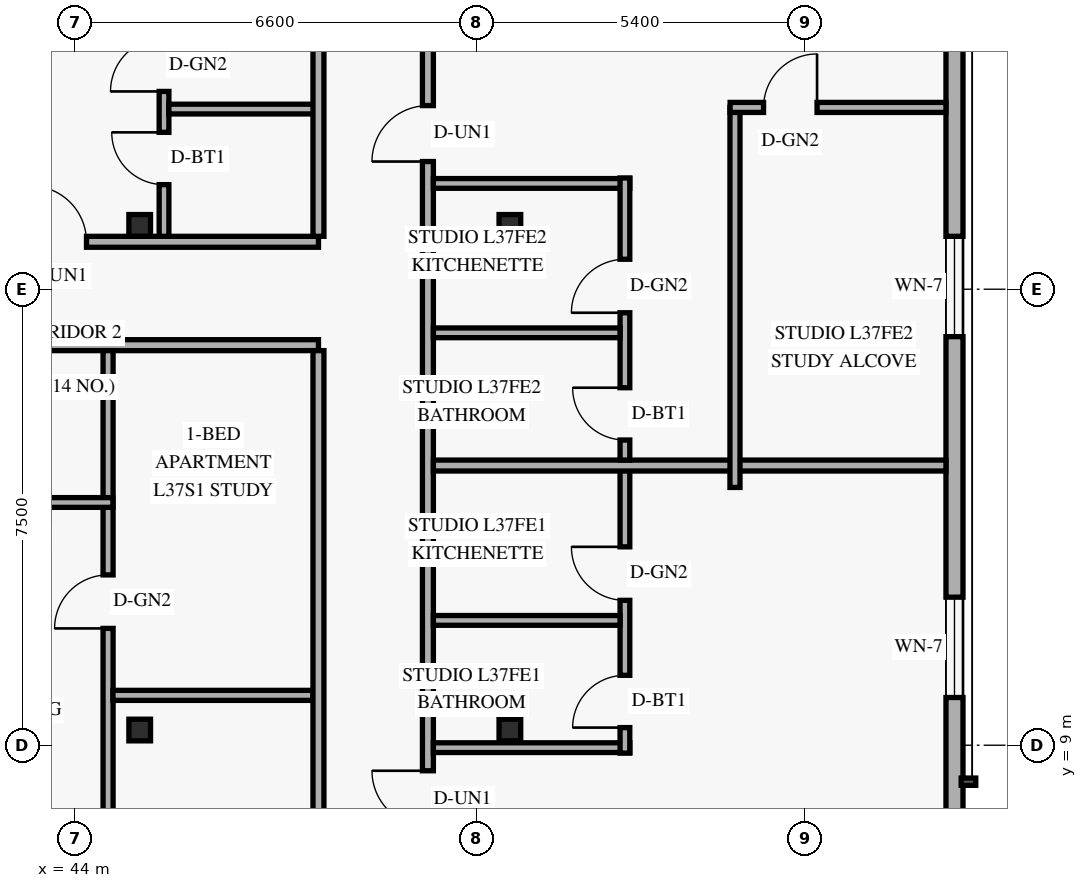
"""IFC4 building model, lengths in metres.
Left out: names, types, materials, properties, quantities, classifications, styles, units other than length and angle.
Written with IfcOpenShell. Run it as: python <this file> out.ifc"""

import sys

from ifc_helpers import new_model, si_unit, direction, frame, frame_2d, origin, origin_2d, place, context, subcontext, project, spatial, rectangle, hollow_rectangle, extrude, element, fill, save


model = new_model("IFC4")
c1 = context("Model", 3, precision=1e-05, world=origin(), true_north=direction((0.0, 1.0)))
c2 = subcontext(c1, "Body", "Model", "MODEL_VIEW")
j1 = project(units=[si_unit("LENGTHUNIT", "METRE"), si_unit("PLANEANGLEUNIT", "RADIAN")], contexts=[c1])
p1 = place(None, origin())
s1 = spatial("IfcSite", under=j1, at=p1, CompositionType="ELEMENT")
p2 = place(p1, origin())
s2 = spatial("IfcBuilding", under=s1, at=p2, CompositionType="ELEMENT")
p3 = place(p2, frame((0.0, 0.0, 144.6)))
s3 = spatial("IfcBuildingStorey", under=s2, at=p3, CompositionType="ELEMENT", Elevation=144.6)
for number, where, z_axis, x_axis in (
    (1, (44.997, 9.25, 0.0), (0.035, 0.0, 0.999), (0.0, 1.0, 0.0)),
    (2, (44.997, 17.55, 0.0), (0.035, 0.0, 0.999), (0.0, 1.0, 0.0)),
):
    element("IfcColumn", number, at=place(p3, frame(where, z_axis=z_axis, x_axis=x_axis)), inside=s3, PredefinedType="COLUMN", context=c2, shape_type="SweptSolid", body=[
        extrude(hollow_rectangle(XDim=0.356, YDim=0.356, WallThickness=0.016, at=origin_2d()), origin(), (0.0, 0.0, 1.0), 3.602),
    ])
for number, where, z_axis, x_axis in (
    (3, (51.044, 9.25, 0.0), (0.058, 0.0, 0.998), (0.0, 1.0, 0.0)),
    (4, (51.044, 17.55, 0.0), (0.058, 0.0, 0.998), (0.0, 1.0, 0.0)),
):
    element("IfcColumn", number, at=place(p3, frame(where, z_axis=z_axis, x_axis=x_axis)), inside=s3, PredefinedType="COLUMN", context=c2, shape_type="SweptSolid", body=[
        extrude(hollow_rectangle(XDim=0.356, YDim=0.356, WallThickness=0.016, at=origin_2d()), origin(), (0.0, 0.0, 1.0), 3.606),
    ])
p4 = place(p3, frame((58.46, 7.62, 0.0), z_axis=(0.0, 0.0, 1.0), x_axis=(0.0, 1.0, 0.0)))
e5 = element("IfcWall", 5, at=p4, inside=s3, PredefinedType="SOLIDWALL", context=c2, shape_type="SweptSolid", body=[
    extrude(rectangle(XDim=32.76, YDim=0.28, at=frame_2d((16.38, 0.0))), origin(), (0.0, 0.0, 1.0), 3.36),
])
p5 = place(p4, frame((2.165, 0.0, 0.85)))
e6 = element("IfcOpeningElement", 6, at=p5, cuts=e5, PredefinedType="OPENING", context=c2, shape_type="SweptSolid", body=[
    extrude(rectangle(XDim=1.65, YDim=1.6, at=frame_2d((0.825, 0.8))), frame((0.0, 0.15, 0.0), z_axis=(0.0, -1.0, 0.0), x_axis=(1.0, 0.0, 0.0)), (0.0, 0.0, 1.0), 0.3),
])
p6 = place(p4, frame((8.1, 0.0, 0.85)))
e7 = element("IfcOpeningElement", 7, at=p6, cuts=e5, PredefinedType="OPENING", context=c2, shape_type="SweptSolid", body=[
    extrude(rectangle(XDim=1.65, YDim=1.6, at=frame_2d((0.825, 0.8))), frame((0.0, 0.15, 0.0), z_axis=(0.0, -1.0, 0.0), x_axis=(1.0, 0.0, 0.0)), (0.0, 0.0, 1.0), 0.3),
])
p7 = place(p4, frame((13.5, 0.0, 0.85)))
e8 = element("IfcOpeningElement", 8, at=p7, cuts=e5, PredefinedType="OPENING", context=c2, shape_type="SweptSolid", body=[
    extrude(rectangle(XDim=1.65, YDim=1.6, at=frame_2d((0.825, 0.8))), frame((0.0, 0.15, 0.0), z_axis=(0.0, -1.0, 0.0), x_axis=(1.0, 0.0, 0.0)), (0.0, 0.0, 1.0), 0.3),
])
p8 = place(p4, frame((19.424, 0.0, 0.85)))
e9 = element("IfcOpeningElement", 9, at=p8, cuts=e5, PredefinedType="OPENING", context=c2, shape_type="SweptSolid", body=[
    extrude(rectangle(XDim=1.65, YDim=1.6, at=frame_2d((0.825, 0.8))), frame((0.0, 0.15, 0.0), z_axis=(0.0, -1.0, 0.0), x_axis=(1.0, 0.0, 0.0)), (0.0, 0.0, 1.0), 0.3),
])
p9 = place(p4, frame((24.624, 0.0, 0.85)))
e10 = element("IfcOpeningElement", 10, at=p9, cuts=e5, PredefinedType="OPENING", context=c2, shape_type="SweptSolid", body=[
    extrude(rectangle(XDim=1.65, YDim=1.6, at=frame_2d((0.825, 0.8))), frame((0.0, 0.15, 0.0), z_axis=(0.0, -1.0, 0.0), x_axis=(1.0, 0.0, 0.0)), (0.0, 0.0, 1.0), 0.3),
])
p10 = place(p4, frame((29.145, 0.0, 0.85)))
e11 = element("IfcOpeningElement", 11, at=p10, cuts=e5, PredefinedType="OPENING", context=c2, shape_type="SweptSolid", body=[
    extrude(rectangle(XDim=1.65, YDim=1.6, at=frame_2d((0.825, 0.8))), frame((0.0, 0.15, 0.0), z_axis=(0.0, -1.0, 0.0), x_axis=(1.0, 0.0, 0.0)), (0.0, 0.0, 1.0), 0.3),
])
p11 = place(p3, frame((38.433, 15.58, 0.0), z_axis=(0.0, 0.0, 1.0), x_axis=(1.0, 0.0, 0.0)))
e12 = element("IfcWall", 12, at=p11, inside=s3, PredefinedType="STANDARD", context=c2, shape_type="SweptSolid", body=[
    extrude(rectangle(XDim=9.567, YDim=0.18, at=frame_2d((4.784, 0.0))), origin(), (0.0, 0.0, 1.0), 2.73),
])
p12 = place(p11, frame((0.327, 0.0, 0.0)))
e13 = element("IfcOpeningElement", 13, at=p12, cuts=e12, PredefinedType="OPENING", context=c2, shape_type="SweptSolid", body=[
    extrude(rectangle(XDim=0.92, YDim=2.15, at=frame_2d((0.46, 1.075))), frame((0.0, 0.1, 0.0), z_axis=(0.0, -1.0, 0.0), x_axis=(1.0, 0.0, 0.0)), (0.0, 0.0, 1.0), 0.2),
])
p13 = place(p3, frame((37.64, 17.28, 0.0), z_axis=(0.0, 0.0, 1.0), x_axis=(1.0, 0.0, 0.0)))
e14 = element("IfcWall", 14, at=p13, inside=s3, PredefinedType="STANDARD", context=c2, shape_type="SweptSolid", body=[
    extrude(rectangle(XDim=10.36, YDim=0.18, at=frame_2d((5.18, 0.0))), origin(), (0.0, 0.0, 1.0), 2.73),
])
p14 = place(p13, frame((5.625, 0.0, 0.0)))
e15 = element("IfcOpeningElement", 15, at=p14, cuts=e14, PredefinedType="OPENING", context=c2, shape_type="SweptSolid", body=[
    extrude(rectangle(XDim=0.92, YDim=2.15, at=frame_2d((0.46, 1.075))), frame((0.0, 0.1, 0.0), z_axis=(0.0, -1.0, 0.0), x_axis=(1.0, 0.0, 0.0)), (0.0, 0.0, 1.0), 0.2),
])
p15 = place(p3, frame((44.54, 4.28, 0.0), z_axis=(0.0, 0.0, 1.0), x_axis=(0.0, 1.0, 0.0)))
e16 = element("IfcWall", 16, at=p15, inside=s3, PredefinedType="PARTITIONING", context=c2, shape_type="SweptSolid", body=[
    extrude(rectangle(XDim=11.21, YDim=0.165, at=frame_2d((5.605, 0.0))), origin(), (0.0, 0.0, 1.0), 2.73),
])
p16 = place(p15, frame((2.5, 0.0, 0.0)))
e17 = element("IfcOpeningElement", 17, at=p16, cuts=e16, PredefinedType="OPENING", context=c2, shape_type="SweptSolid", body=[
    extrude(rectangle(XDim=0.88, YDim=2.14, at=frame_2d((0.44, 1.07))), frame((0.0, 0.093, 0.0), z_axis=(0.0, -1.0, 0.0), x_axis=(1.0, 0.0, 0.0)), (0.0, 0.0, 1.0), 0.185),
])
p17 = place(p15, frame((6.641, 0.0, 0.0)))
e18 = element("IfcOpeningElement", 18, at=p17, cuts=e16, PredefinedType="OPENING", context=c2, shape_type="SweptSolid", body=[
    extrude(rectangle(XDim=0.88, YDim=2.12, at=frame_2d((0.44, 1.06))), frame((0.0, 0.093, 0.0), z_axis=(0.0, -1.0, 0.0), x_axis=(1.0, 0.0, 0.0)), (0.0, 0.0, 1.0), 0.185),
])
p18 = place(p3, frame((39.91, 12.992, 0.0), z_axis=(0.0, 0.0, 1.0), x_axis=(1.0, 0.0, 0.0)))
e19 = element("IfcWall", 19, at=p18, inside=s3, PredefinedType="PLUMBINGWALL", context=c2, shape_type="SweptSolid", body=[
    extrude(rectangle(XDim=4.71, YDim=0.16, at=frame_2d((2.355, 0.0))), origin(), (0.0, 0.0, 1.0), 3.36),
])
p19 = place(p18, frame((0.38, 0.0, 0.0)))
e20 = element("IfcOpeningElement", 20, at=p19, cuts=e19, PredefinedType="OPENING", context=c2, shape_type="SweptSolid", body=[
    extrude(rectangle(XDim=0.88, YDim=2.12, at=frame_2d((0.44, 1.06))), frame((0.0, 0.09, 0.0), z_axis=(0.0, -1.0, 0.0), x_axis=(1.0, 0.0, 0.0)), (0.0, 0.0, 1.0), 0.18),
])
p20 = place(p18, frame((2.786, 0.0, 0.0)))
e21 = element("IfcOpeningElement", 21, at=p20, cuts=e19, PredefinedType="OPENING", context=c2, shape_type="SweptSolid", body=[
    extrude(rectangle(XDim=0.86, YDim=2.12, at=frame_2d((0.43, 1.06))), frame((0.0, 0.09, 0.0), z_axis=(0.0, -1.0, 0.0), x_axis=(1.0, 0.0, 0.0)), (0.0, 0.0, 1.0), 0.18),
])
p21 = place(p3, frame((44.62, 9.82, 0.0), z_axis=(0.0, 0.0, 1.0), x_axis=(1.0, 0.0, 0.0)))
e22 = element("IfcWall", 22, at=p21, inside=s3, PredefinedType="PARTITIONING", context=c2, shape_type="SweptSolid", body=[
    extrude(rectangle(XDim=3.29, YDim=0.165, at=frame_2d((1.645, 0.0))), origin(), (0.0, 0.0, 1.0), 2.73),
])
p22 = place(p3, frame((45.46, 17.37, 0.0), z_axis=(0.0, 0.0, 1.0), x_axis=(0.0, 1.0, 0.0)))
e23 = element("IfcWall", 23, at=p22, inside=s3, PredefinedType="PLUMBINGWALL", context=c2, shape_type="SweptSolid", body=[
    extrude(rectangle(XDim=4.64, YDim=0.16, at=frame_2d((2.32, 0.0))), origin(), (0.0, 0.0, 1.0), 2.73),
])
p23 = place(p22, frame((0.85, 0.0, 0.0)))
e24 = element("IfcOpeningElement", 24, at=p23, cuts=e23, PredefinedType="OPENING", context=c2, shape_type="SweptSolid", body=[
    extrude(rectangle(XDim=0.86, YDim=2.12, at=frame_2d((0.43, 1.06))), frame((0.0, 0.09, 0.0), z_axis=(0.0, -1.0, 0.0), x_axis=(1.0, 0.0, 0.0)), (0.0, 0.0, 1.0), 0.18),
])
p24 = place(p22, frame((2.383, 0.0, 0.0)))
e25 = element("IfcOpeningElement", 25, at=p24, cuts=e23, PredefinedType="OPENING", context=c2, shape_type="SweptSolid", body=[
    extrude(rectangle(XDim=0.88, YDim=2.12, at=frame_2d((0.44, 1.06))), frame((0.0, 0.09, 0.0), z_axis=(0.0, -1.0, 0.0), x_axis=(1.0, 0.0, 0.0)), (0.0, 0.0, 1.0), 0.18),
])
p25 = place(p3, frame((45.54, 19.463, 0.0), z_axis=(0.0, 0.0, 1.0), x_axis=(1.0, 0.0, 0.0)))
e26 = element("IfcWall", 26, at=p25, inside=s3, PredefinedType="PLUMBINGWALL", context=c2, shape_type="SweptSolid", body=[
    extrude(rectangle(XDim=2.46, YDim=0.16, at=frame_2d((1.23, 0.0))), origin(), (0.0, 0.0, 1.0), 3.36),
])
p26 = place(p3, frame((49.8, 4.28, 0.0), z_axis=(0.0, 0.0, 1.0), x_axis=(0.0, 1.0, 0.0)))
e27 = element("IfcWall", 27, at=p26, inside=s3, PredefinedType="STANDARD", context=c2, shape_type="SweptSolid", body=[
    extrude(rectangle(XDim=39.44, YDim=0.18, at=frame_2d((19.72, 0.0))), origin(), (0.0, 0.0, 1.0), 2.73),
])
p27 = place(p26, frame((3.38, 0.0, 0.0)))
e28 = element("IfcOpeningElement", 28, at=p27, cuts=e27, PredefinedType="OPENING", context=c2, shape_type="SweptSolid", body=[
    extrude(rectangle(XDim=0.92, YDim=2.15, at=frame_2d((0.46, 1.075))), frame((0.0, 0.1, 0.0), z_axis=(0.0, -1.0, 0.0), x_axis=(1.0, 0.0, 0.0)), (0.0, 0.0, 1.0), 0.2),
])
p28 = place(p26, frame((14.32, 0.0, 0.0)))
e29 = element("IfcOpeningElement", 29, at=p28, cuts=e27, PredefinedType="OPENING", context=c2, shape_type="SweptSolid", body=[
    extrude(rectangle(XDim=0.92, YDim=2.15, at=frame_2d((0.46, 1.075))), frame((0.0, 0.1, 0.0), z_axis=(0.0, -1.0, 0.0), x_axis=(1.0, 0.0, 0.0)), (0.0, 0.0, 1.0), 0.2),
])
p29 = place(p26, frame((21.05, 0.0, 0.0)))
e30 = element("IfcOpeningElement", 30, at=p29, cuts=e27, PredefinedType="OPENING", context=c2, shape_type="SweptSolid", body=[
    extrude(rectangle(XDim=0.92, YDim=2.15, at=frame_2d((0.46, 1.075))), frame((0.0, 0.1, 0.0), z_axis=(0.0, -1.0, 0.0), x_axis=(1.0, 0.0, 0.0)), (0.0, 0.0, 1.0), 0.2),
])
p30 = place(p26, frame((35.42, 0.0, 0.0)))
e31 = element("IfcOpeningElement", 31, at=p30, cuts=e27, PredefinedType="OPENING", context=c2, shape_type="SweptSolid", body=[
    extrude(rectangle(XDim=0.92, YDim=2.15, at=frame_2d((0.46, 1.075))), frame((0.0, 0.1, 0.0), z_axis=(0.0, -1.0, 0.0), x_axis=(1.0, 0.0, 0.0)), (0.0, 0.0, 1.0), 0.2),
])
p31 = place(p3, frame((48.0, 4.28, 0.0), z_axis=(0.0, 0.0, 1.0), x_axis=(0.0, 1.0, 0.0)))
e32 = element("IfcWall", 32, at=p31, inside=s3, PredefinedType="STANDARD", context=c2, shape_type="SweptSolid", body=[
    extrude(rectangle(XDim=11.21, YDim=0.18, at=frame_2d((5.605, 0.0))), origin(), (0.0, 0.0, 1.0), 2.73),
])
p32 = place(p3, frame((48.0, 17.37, 0.0), z_axis=(0.0, 0.0, 1.0), x_axis=(0.0, 1.0, 0.0)))
e33 = element("IfcWall", 33, at=p32, inside=s3, PredefinedType="STANDARD", context=c2, shape_type="SweptSolid", body=[
    extrude(rectangle(XDim=10.1, YDim=0.18, at=frame_2d((5.05, 0.0))), origin(), (0.0, 0.0, 1.0), 2.73),
])
p33 = place(p3, frame((49.89, 8.96, 0.0), z_axis=(0.0, 0.0, 1.0), x_axis=(1.0, 0.0, 0.0)))
e34 = element("IfcWall", 34, at=p33, inside=s3, PredefinedType="PLUMBINGWALL", context=c2, shape_type="SweptSolid", body=[
    extrude(rectangle(XDim=3.23, YDim=0.16, at=frame_2d((1.615, 0.0))), origin(), (0.0, 0.0, 1.0), 2.879),
])
p34 = place(p3, frame((53.04, 8.87, 0.0), z_axis=(0.0, 0.0, 1.0), x_axis=(0.0, 1.0, 0.0)))
e35 = element("IfcWall", 35, at=p34, inside=s3, PredefinedType="PLUMBINGWALL", context=c2, shape_type="SweptSolid", body=[
    extrude(rectangle(XDim=4.73, YDim=0.16, at=frame_2d((2.365, 0.0))), origin(), (0.0, 0.0, 1.0), 3.36),
])
p35 = place(p34, frame((0.42, 0.0, 0.0)))
e36 = element("IfcOpeningElement", 36, at=p35, cuts=e35, PredefinedType="OPENING", context=c2, shape_type="SweptSolid", body=[
    extrude(rectangle(XDim=0.86, YDim=2.12, at=frame_2d((0.43, 1.06))), frame((0.0, 0.09, 0.0), z_axis=(0.0, -1.0, 0.0), x_axis=(1.0, 0.0, 0.0)), (0.0, 0.0, 1.0), 0.18),
])
p36 = place(p34, frame((2.513, 0.0, 0.0)))
e37 = element("IfcOpeningElement", 37, at=p36, cuts=e35, PredefinedType="OPENING", context=c2, shape_type="SweptSolid", body=[
    extrude(rectangle(XDim=0.88, YDim=2.12, at=frame_2d((0.44, 1.06))), frame((0.0, 0.09, 0.0), z_axis=(0.0, -1.0, 0.0), x_axis=(1.0, 0.0, 0.0)), (0.0, 0.0, 1.0), 0.18),
])
p37 = place(p3, frame((49.89, 11.053, 0.0), z_axis=(0.0, 0.0, 1.0), x_axis=(1.0, 0.0, 0.0)))
e38 = element("IfcWall", 38, at=p37, inside=s3, PredefinedType="PLUMBINGWALL", context=c2, shape_type="SweptSolid", body=[
    extrude(rectangle(XDim=3.07, YDim=0.16, at=frame_2d((1.535, 0.0))), origin(), (0.0, 0.0, 1.0), 2.879),
])
p38 = place(p3, frame((49.89, 13.6, 0.0), z_axis=(0.0, 0.0, 1.0), x_axis=(1.0, 0.0, 0.0)))
e39 = element("IfcWall", 39, at=p38, inside=s3, PredefinedType="PARTITIONING", context=c2, shape_type="SweptSolid", body=[
    extrude(rectangle(XDim=8.43, YDim=0.18, at=frame_2d((4.215, 0.0))), origin(), (0.0, 0.0, 1.0), 2.879),
])
p39 = place(p3, frame((49.89, 18.24, 0.0), z_axis=(0.0, 0.0, 1.0), x_axis=(1.0, 0.0, 0.0)))
e40 = element("IfcWall", 40, at=p39, inside=s3, PredefinedType="PLUMBINGWALL", context=c2, shape_type="SweptSolid", body=[
    extrude(rectangle(XDim=3.23, YDim=0.16, at=frame_2d((1.615, 0.0))), origin(), (0.0, 0.0, 1.0), 2.879),
])
p40 = place(p3, frame((53.04, 13.69, 0.0), z_axis=(0.0, 0.0, 1.0), x_axis=(0.0, 1.0, 0.0)))
e41 = element("IfcWall", 41, at=p40, inside=s3, PredefinedType="PLUMBINGWALL", context=c2, shape_type="SweptSolid", body=[
    extrude(rectangle(XDim=4.64, YDim=0.16, at=frame_2d((2.32, 0.0))), origin(), (0.0, 0.0, 1.0), 3.36),
])
p41 = place(p40, frame((0.33, 0.0, 0.0)))
e42 = element("IfcOpeningElement", 42, at=p41, cuts=e41, PredefinedType="OPENING", context=c2, shape_type="SweptSolid", body=[
    extrude(rectangle(XDim=0.86, YDim=2.12, at=frame_2d((0.43, 1.06))), frame((0.0, 0.09, 0.0), z_axis=(0.0, -1.0, 0.0), x_axis=(1.0, 0.0, 0.0)), (0.0, 0.0, 1.0), 0.18),
])
p42 = place(p40, frame((2.423, 0.0, 0.0)))
e43 = element("IfcOpeningElement", 43, at=p42, cuts=e41, PredefinedType="OPENING", context=c2, shape_type="SweptSolid", body=[
    extrude(rectangle(XDim=0.88, YDim=2.12, at=frame_2d((0.44, 1.06))), frame((0.0, 0.09, 0.0), z_axis=(0.0, -1.0, 0.0), x_axis=(1.0, 0.0, 0.0)), (0.0, 0.0, 1.0), 0.18),
])
p43 = place(p3, frame((49.89, 15.783, 0.0), z_axis=(0.0, 0.0, 1.0), x_axis=(1.0, 0.0, 0.0)))
e44 = element("IfcWall", 44, at=p43, inside=s3, PredefinedType="PLUMBINGWALL", context=c2, shape_type="SweptSolid", body=[
    extrude(rectangle(XDim=3.07, YDim=0.16, at=frame_2d((1.535, 0.0))), origin(), (0.0, 0.0, 1.0), 2.879),
])
p44 = place(p3, frame((54.85, 13.24, 0.0), z_axis=(0.0, 0.0, 1.0), x_axis=(0.0, 1.0, 0.0)))
e45 = element("IfcWall", 45, at=p44, inside=s3, PredefinedType="PARTITIONING", context=c2, shape_type="SweptSolid", body=[
    extrude(rectangle(XDim=6.25, YDim=0.165, at=frame_2d((3.125, 0.0))), origin(), (0.0, 0.0, 1.0), 3.36),
])
p45 = place(p3, frame((54.77, 19.49, 0.0), z_axis=(0.0, 0.0, 1.0), x_axis=(1.0, 0.0, 0.0)))
e46 = element("IfcWall", 46, at=p45, inside=s3, PredefinedType="PARTITIONING", context=c2, shape_type="SweptSolid", body=[
    extrude(rectangle(XDim=3.55, YDim=0.165, at=frame_2d((1.775, 0.0))), origin(), (0.0, 0.0, 1.0), 3.36),
])
p46 = place(p45, frame((0.55, 0.0, 0.0)))
e47 = element("IfcOpeningElement", 47, at=p46, cuts=e46, PredefinedType="OPENING", context=c2, shape_type="SweptSolid", body=[
    extrude(rectangle(XDim=0.88, YDim=2.12, at=frame_2d((0.44, 1.06))), frame((0.0, 0.093, 0.0), z_axis=(0.0, -1.0, 0.0), x_axis=(1.0, 0.0, 0.0)), (0.0, 0.0, 1.0), 0.185),
])
p47 = place(p5, origin())
e48 = element("IfcWindow", 48, at=p47, inside=s3, PartitioningType="SINGLE_PANEL", PredefinedType="WINDOW", context=c2, shape_type="SweptSolid", body=[
    extrude(rectangle(XDim=1.65, YDim=1.6, at=frame_2d((0.825, 0.8))), frame((0.0, 0.03, 0.0), z_axis=(0.0, -1.0, 0.0), x_axis=(1.0, 0.0, 0.0)), (0.0, 0.0, 1.0), 0.06),
])
fill(e6, e48)
p48 = place(p6, origin())
e49 = element("IfcWindow", 49, at=p48, inside=s3, PartitioningType="SINGLE_PANEL", PredefinedType="WINDOW", context=c2, shape_type="SweptSolid", body=[
    extrude(rectangle(XDim=1.65, YDim=1.6, at=frame_2d((0.825, 0.8))), frame((0.0, 0.03, 0.0), z_axis=(0.0, -1.0, 0.0), x_axis=(1.0, 0.0, 0.0)), (0.0, 0.0, 1.0), 0.06),
])
fill(e7, e49)
p49 = place(p17, origin())
e50 = element("IfcDoor", 50, at=p49, inside=s3, OperationType="SINGLE_SWING_LEFT", PredefinedType="DOOR", context=c2, shape_type="SweptSolid", body=[
    extrude(rectangle(XDim=0.88, YDim=2.12, at=frame_2d((0.44, 1.06))), frame((0.0, 0.025, 0.0), z_axis=(0.0, -1.0, 0.0), x_axis=(1.0, 0.0, 0.0)), (0.0, 0.0, 1.0), 0.05),
])
fill(e18, e50)
p50 = place(p14, origin())
e51 = element("IfcDoor", 51, at=p50, inside=s3, OperationType="SINGLE_SWING_LEFT", PredefinedType="DOOR", context=c2, shape_type="SweptSolid", body=[
    extrude(rectangle(XDim=0.92, YDim=2.15, at=frame_2d((0.46, 1.075))), frame((0.0, 0.025, 0.0), z_axis=(0.0, -1.0, 0.0), x_axis=(1.0, 0.0, 0.0)), (0.0, 0.0, 1.0), 0.05),
])
fill(e15, e51)
p51 = place(p23, origin())
e52 = element("IfcDoor", 52, at=p51, inside=s3, OperationType="SINGLE_SWING_RIGHT", PredefinedType="DOOR", context=c2, shape_type="SweptSolid", body=[
    extrude(rectangle(XDim=0.86, YDim=2.12, at=frame_2d((0.43, 1.06))), frame((0.0, 0.025, 0.0), z_axis=(0.0, -1.0, 0.0), x_axis=(1.0, 0.0, 0.0)), (0.0, 0.0, 1.0), 0.05),
])
fill(e24, e52)
p52 = place(p24, origin())
e53 = element("IfcDoor", 53, at=p52, inside=s3, OperationType="SINGLE_SWING_LEFT", PredefinedType="DOOR", context=c2, shape_type="SweptSolid", body=[
    extrude(rectangle(XDim=0.88, YDim=2.12, at=frame_2d((0.44, 1.06))), frame((0.0, 0.025, 0.0), z_axis=(0.0, -1.0, 0.0), x_axis=(1.0, 0.0, 0.0)), (0.0, 0.0, 1.0), 0.05),
])
fill(e25, e53)
p53 = place(p27, origin())
e54 = element("IfcDoor", 54, at=p53, inside=s3, OperationType="SINGLE_SWING_RIGHT", PredefinedType="DOOR", context=c2, shape_type="SweptSolid", body=[
    extrude(rectangle(XDim=0.92, YDim=2.15, at=frame_2d((0.46, 1.075))), frame((0.0, 0.025, 0.0), z_axis=(0.0, -1.0, 0.0), x_axis=(1.0, 0.0, 0.0)), (0.0, 0.0, 1.0), 0.05),
])
fill(e28, e54)
p54 = place(p35, origin())
e55 = element("IfcDoor", 55, at=p54, inside=s3, OperationType="SINGLE_SWING_LEFT", PredefinedType="DOOR", context=c2, shape_type="SweptSolid", body=[
    extrude(rectangle(XDim=0.86, YDim=2.12, at=frame_2d((0.43, 1.06))), frame((0.0, 0.025, 0.0), z_axis=(0.0, -1.0, 0.0), x_axis=(1.0, 0.0, 0.0)), (0.0, 0.0, 1.0), 0.05),
])
fill(e36, e55)
p55 = place(p36, origin())
e56 = element("IfcDoor", 56, at=p55, inside=s3, OperationType="SINGLE_SWING_RIGHT", PredefinedType="DOOR", context=c2, shape_type="SweptSolid", body=[
    extrude(rectangle(XDim=0.88, YDim=2.12, at=frame_2d((0.44, 1.06))), frame((0.0, 0.025, 0.0), z_axis=(0.0, -1.0, 0.0), x_axis=(1.0, 0.0, 0.0)), (0.0, 0.0, 1.0), 0.05),
])
fill(e37, e56)
p56 = place(p46, origin())
e57 = element("IfcDoor", 57, at=p56, inside=s3, OperationType="SINGLE_SWING_RIGHT", PredefinedType="DOOR", context=c2, shape_type="SweptSolid", body=[
    extrude(rectangle(XDim=0.88, YDim=2.12, at=frame_2d((0.44, 1.06))), frame((0.0, 0.025, 0.0), z_axis=(0.0, -1.0, 0.0), x_axis=(1.0, 0.0, 0.0)), (0.0, 0.0, 1.0), 0.05),
])
fill(e47, e57)
p57 = place(p28, origin())
e58 = element("IfcDoor", 58, at=p57, inside=s3, OperationType="SINGLE_SWING_LEFT", PredefinedType="DOOR", context=c2, shape_type="SweptSolid", body=[
    extrude(rectangle(XDim=0.92, YDim=2.15, at=frame_2d((0.46, 1.075))), frame((0.0, 0.025, 0.0), z_axis=(0.0, -1.0, 0.0), x_axis=(1.0, 0.0, 0.0)), (0.0, 0.0, 1.0), 0.05),
])
fill(e29, e58)
p58 = place(p41, origin())
e59 = element("IfcDoor", 59, at=p58, inside=s3, OperationType="SINGLE_SWING_RIGHT", PredefinedType="DOOR", context=c2, shape_type="SweptSolid", body=[
    extrude(rectangle(XDim=0.86, YDim=2.12, at=frame_2d((0.43, 1.06))), frame((0.0, 0.025, 0.0), z_axis=(0.0, -1.0, 0.0), x_axis=(1.0, 0.0, 0.0)), (0.0, 0.0, 1.0), 0.05),
])
fill(e42, e59)
p59 = place(p42, origin())
e60 = element("IfcDoor", 60, at=p59, inside=s3, OperationType="SINGLE_SWING_LEFT", PredefinedType="DOOR", context=c2, shape_type="SweptSolid", body=[
    extrude(rectangle(XDim=0.88, YDim=2.12, at=frame_2d((0.44, 1.06))), frame((0.0, 0.025, 0.0), z_axis=(0.0, -1.0, 0.0), x_axis=(1.0, 0.0, 0.0)), (0.0, 0.0, 1.0), 0.05),
])
fill(e43, e60)
save(model, sys.argv[1])
